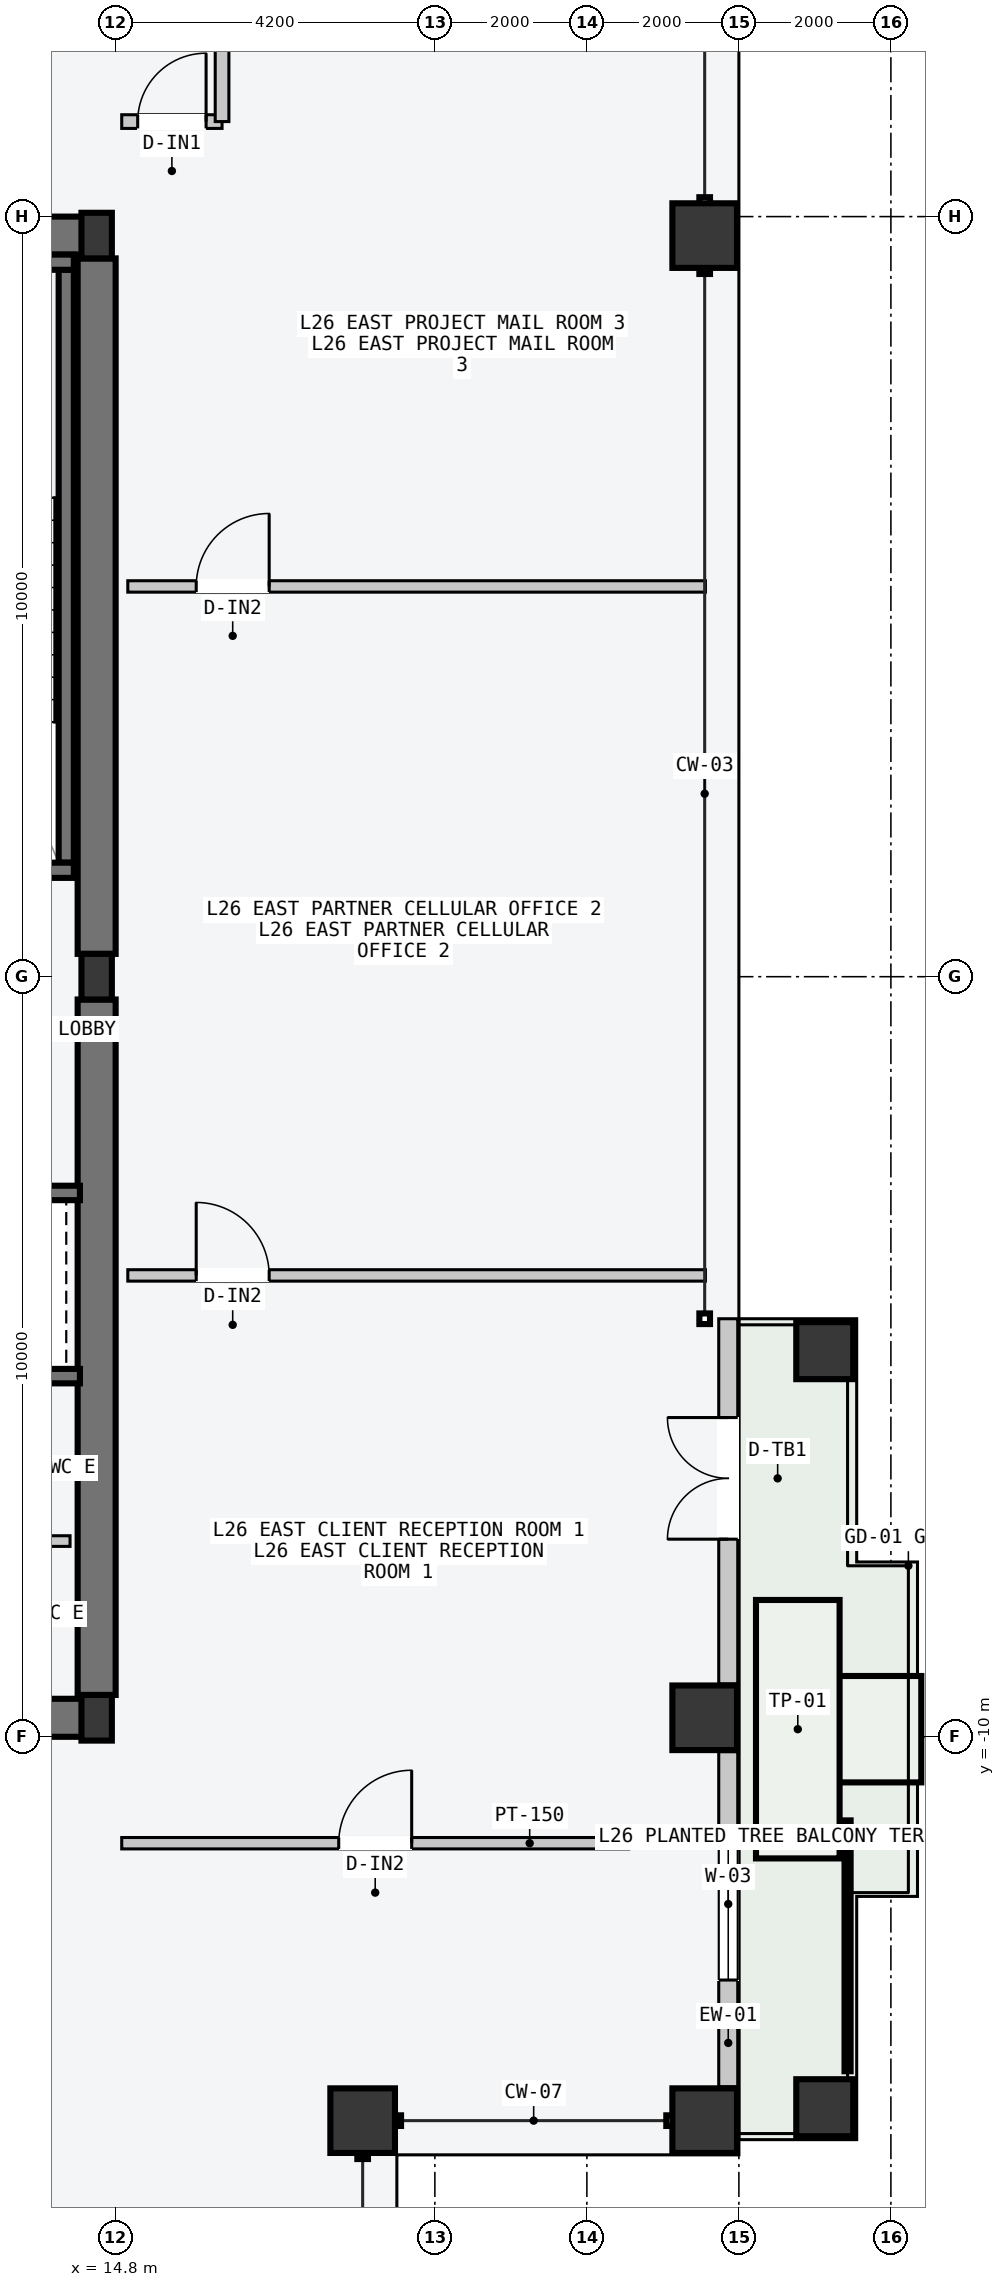
"""IFC4 building model, lengths in metres.
Left out: names, types, materials, properties, quantities, classifications, styles, units other than length and angle.
Written with IfcOpenShell. Run it as: python <this file> out.ifc"""

import sys

from ifc_helpers import new_model, si_unit, direction, frame, frame_2d, origin, origin_2d, place, context, subcontext, project, spatial, rectangle, hollow_rectangle, i_section, extrude, element, fill, save


model = new_model("IFC4")
c1 = context("Model", 3, precision=1e-05, world=origin(), true_north=direction((0.0, 1.0)))
c2 = subcontext(c1, "Body", "Model", "MODEL_VIEW")
j1 = project(units=[si_unit("LENGTHUNIT", "METRE"), si_unit("PLANEANGLEUNIT", "RADIAN")], contexts=[c1])
p1 = place(None, origin())
s1 = spatial("IfcSite", under=j1, at=p1, CompositionType="ELEMENT")
p2 = place(p1, origin())
s2 = spatial("IfcBuilding", under=s1, at=p2, CompositionType="ELEMENT")
p3 = place(p2, frame((0.0, 0.0, 102.6)))
s3 = spatial("IfcBuildingStorey", under=s2, at=p3, CompositionType="ELEMENT", Elevation=102.6)
for number, where, z_axis, x_axis in (
    (1, (8.07, -9.75, -0.2), (0.0, 0.0, 1.0), (1.0, 0.0, 0.0)),
    (2, (8.07, 9.75, -0.2), (0.0, 0.0, 1.0), (1.0, 0.0, 0.0)),
):
    element("IfcWall", number, at=place(p3, frame(where, z_axis=z_axis, x_axis=x_axis)), inside=s3, PredefinedType="SHEAR", context=c2, shape_type="SweptSolid", body=[
        extrude(rectangle(XDim=6.46, YDim=0.5, at=frame_2d((3.23, 0.0))), origin(), (0.0, 0.0, 1.0), 3.6),
    ])
for number, where, z_axis, x_axis in (
    (3, (14.55, -9.45, -0.2), (0.0, 0.0, 1.0), (0.0, 1.0, 0.0)),
    (4, (14.55, 0.3, -0.2), (0.0, 0.0, 1.0), (0.0, 1.0, 0.0)),
):
    element("IfcWall", number, at=place(p3, frame(where, z_axis=z_axis, x_axis=x_axis)), inside=s3, PredefinedType="SHEAR", context=c2, shape_type="SweptSolid", body=[
        extrude(rectangle(XDim=9.15, YDim=0.5, at=frame_2d((4.575, 0.0))), origin(), (0.0, 0.0, 1.0), 3.6),
    ])
p4 = place(p3, frame((14.15, 1.5, -0.2), z_axis=(0.0, 0.0, 1.0), x_axis=(0.0, 1.0, 0.0)))
e5 = element("IfcWall", 5, at=p4, inside=s3, PredefinedType="SOLIDWALL", context=c2, shape_type="SweptSolid", body=[
    extrude(rectangle(XDim=7.8, YDim=0.2, at=frame_2d((3.9, 0.0))), origin(), (0.0, 0.0, 1.0), 3.6),
])
p5 = place(p3, frame((10.15, 1.4, -0.2), z_axis=(0.0, 0.0, 1.0), x_axis=(1.0, 0.0, 0.0)))
e6 = element("IfcWall", 6, at=p5, inside=s3, PredefinedType="SOLIDWALL", context=c2, shape_type="SweptSolid", body=[
    extrude(rectangle(XDim=4.1, YDim=0.2, at=frame_2d((2.05, 0.0))), origin(), (0.0, 0.0, 1.0), 3.6),
])
p6 = place(p5, frame((1.5, 0.0, 0.2)))
e7 = element("IfcOpeningElement", 7, at=p6, cuts=e6, PredefinedType="OPENING", context=c2, shape_type="SweptSolid", body=[
    extrude(rectangle(XDim=1.12, YDim=2.18, at=frame_2d((0.56, 1.09))), frame((0.0, 0.11, 0.0), z_axis=(0.0, -1.0, 0.0), x_axis=(1.0, 0.0, 0.0)), (0.0, 0.0, 1.0), 0.22),
])
p7 = place(p3, frame((10.15, 9.4, -0.2), z_axis=(0.0, 0.0, 1.0), x_axis=(1.0, 0.0, 0.0)))
e8 = element("IfcWall", 8, at=p7, inside=s3, PredefinedType="SOLIDWALL", context=c2, shape_type="SweptSolid", body=[
    extrude(rectangle(XDim=4.1, YDim=0.2, at=frame_2d((2.05, 0.0))), origin(), (0.0, 0.0, 1.0), 3.6),
])
for number, where, z_axis, x_axis in (
    (9, (14.55, -9.75, 0.0), (0.0, 0.0, 1.0), (1.0, 0.0, 0.0)),
    (10, (14.55, 0.0, 0.0), (0.0, 0.0, 1.0), (1.0, 0.0, 0.0)),
    (11, (14.55, 9.75, 0.0), (0.0, 0.0, 1.0), (1.0, 0.0, 0.0)),
):
    element("IfcColumn", number, at=place(p3, frame(where, z_axis=z_axis, x_axis=x_axis)), inside=s3, PredefinedType="COLUMN", context=c2, shape_type="SweptSolid", body=[
        extrude(i_section(OverallWidth=0.4, OverallDepth=0.6, WebThickness=0.022, FlangeThickness=0.036, at=origin_2d()), origin(), (0.0, 0.0, 1.0), 3.6),
    ])
for number, where, z_axis, x_axis in (
    (12, (22.55, -15.05, 0.0), (0.0, 0.0, 1.0), (0.0, 1.0, 0.0)),
    (13, (22.55, -9.75, 0.0), (0.0, 0.0, 1.0), (0.0, 1.0, 0.0)),
    (14, (22.55, 9.75, 0.0), (0.0, 0.0, 1.0), (0.0, 1.0, 0.0)),
    (15, (18.05, -15.05, 0.0), (0.0, 0.0, 1.0), (1.0, 0.0, 0.0)),
):
    element("IfcColumn", number, at=place(p3, frame(where, z_axis=z_axis, x_axis=x_axis)), inside=s3, PredefinedType="COLUMN", context=c2, shape_type="SweptSolid", body=[
        extrude(hollow_rectangle(XDim=0.85, YDim=0.85, WallThickness=0.04, at=origin_2d()), origin(), (0.0, 0.0, 1.0), 3.6),
    ])
for number, where, z_axis, x_axis in (
    (16, (24.13, -14.88, 0.0), (0.0, 0.0, 1.0), (0.0, 1.0, 0.0)),
    (17, (24.13, -4.92, 0.0), (0.0, 0.0, 1.0), (0.0, 1.0, 0.0)),
):
    element("IfcColumn", number, at=place(p3, frame(where, z_axis=z_axis, x_axis=x_axis)), inside=s3, PredefinedType="COLUMN", context=c2, shape_type="SweptSolid", body=[
        extrude(hollow_rectangle(XDim=0.75, YDim=0.75, WallThickness=0.032, at=origin_2d()), origin(), (0.0, 0.0, 1.0), 3.6),
    ])
p8 = place(p3, frame((22.86, -14.605, 0.0), z_axis=(0.0, 0.0, 1.0), x_axis=(0.0, 1.0, 0.0)))
e18 = element("IfcWall", 18, at=p8, inside=s3, PredefinedType="STANDARD", context=c2, shape_type="SweptSolid", body=[
    extrude(rectangle(XDim=4.41, YDim=0.25, at=frame_2d((2.205, 0.0))), origin(), (0.0, 0.0, 1.0), 3.4),
])
p9 = place(p8, frame((1.405, 0.0, 0.85)))
e19 = element("IfcOpeningElement", 19, at=p9, cuts=e18, PredefinedType="OPENING", context=c2, shape_type="SweptSolid", body=[
    extrude(rectangle(XDim=2.0, YDim=2.1, at=frame_2d((1.0, 1.05))), frame((0.0, 0.135, 0.0), z_axis=(0.0, -1.0, 0.0), x_axis=(1.0, 0.0, 0.0)), (0.0, 0.0, 1.0), 0.27),
])
p10 = place(p3, frame((22.86, -9.305, 0.0), z_axis=(0.0, 0.0, 1.0), x_axis=(0.0, 1.0, 0.0)))
e20 = element("IfcWall", 20, at=p10, inside=s3, PredefinedType="STANDARD", context=c2, shape_type="SweptSolid", body=[
    extrude(rectangle(XDim=4.805, YDim=0.25, at=frame_2d((2.402, 0.0))), origin(), (0.0, 0.0, 1.0), 3.4),
])
p11 = place(p10, frame((1.905, 0.0, 0.0)))
e21 = element("IfcOpeningElement", 21, at=p11, cuts=e20, PredefinedType="OPENING", context=c2, shape_type="SweptSolid", body=[
    extrude(rectangle(XDim=1.6, YDim=2.2, at=frame_2d((0.8, 1.1))), frame((0.0, 0.135, 0.0), z_axis=(0.0, -1.0, 0.0), x_axis=(1.0, 0.0, 0.0)), (0.0, 0.0, 1.0), 0.27),
])
p12 = place(p3, frame((11.65, -2.845, -0.2), z_axis=(0.0, 0.0, 1.0), x_axis=(1.0, 0.0, 0.0)))
e22 = element("IfcWall", 22, at=p12, inside=s3, PredefinedType="SOLIDWALL", context=c2, shape_type="SweptSolid", body=[
    extrude(rectangle(XDim=2.68, YDim=0.19, at=frame_2d((1.34, 0.0))), origin(), (0.0, 0.0, 1.0), 3.6),
])
p13 = place(p12, frame((0.65, 0.0, 0.2)))
e23 = element("IfcOpeningElement", 23, at=p13, cuts=e22, PredefinedType="OPENING", context=c2, shape_type="SweptSolid", body=[
    extrude(rectangle(XDim=1.2, YDim=2.2, at=frame_2d((0.6, 1.1))), frame((0.0, 0.105, 0.0), z_axis=(0.0, -1.0, 0.0), x_axis=(1.0, 0.0, 0.0)), (0.0, 0.0, 1.0), 0.21),
])
p14 = place(p3, frame((11.65, -5.255, -0.2), z_axis=(0.0, 0.0, 1.0), x_axis=(1.0, 0.0, 0.0)))
e24 = element("IfcWall", 24, at=p14, inside=s3, PredefinedType="SOLIDWALL", context=c2, shape_type="SweptSolid", body=[
    extrude(rectangle(XDim=2.68, YDim=0.19, at=frame_2d((1.34, 0.0))), origin(), (0.0, 0.0, 1.0), 3.6),
])
p15 = place(p3, frame((11.7, -7.425, 0.0), z_axis=(0.0, 0.0, 1.0), x_axis=(1.0, 0.0, 0.0)))
e25 = element("IfcWall", 25, at=p15, inside=s3, PredefinedType="PARTITIONING", context=c2, shape_type="SweptSolid", body=[
    extrude(rectangle(XDim=2.5, YDim=0.14, at=frame_2d((1.25, 0.0))), origin(), (0.0, 0.0, 1.0), 3.4),
])
p16 = place(p3, frame((14.88, -11.4, 0.0), z_axis=(0.0, 0.0, 1.0), x_axis=(1.0, 0.0, 0.0)))
e26 = element("IfcWall", 26, at=p16, inside=s3, PredefinedType="PARTITIONING", context=c2, shape_type="SweptSolid", body=[
    extrude(rectangle(XDim=6.67, YDim=0.15, at=frame_2d((3.335, 0.0))), origin(), (0.0, 0.0, 1.0), 3.4),
])
p17 = place(p16, frame((2.855, 0.0, 0.0)))
e27 = element("IfcOpeningElement", 27, at=p17, cuts=e26, PredefinedType="OPENING", context=c2, shape_type="SweptSolid", body=[
    extrude(rectangle(XDim=0.96, YDim=2.18, at=frame_2d((0.48, 1.09))), frame((0.0, 0.085, 0.0), z_axis=(0.0, -1.0, 0.0), x_axis=(1.0, 0.0, 0.0)), (0.0, 0.0, 1.0), 0.17),
])
p18 = place(p3, frame((14.88, 11.25, 0.0), z_axis=(0.0, 0.0, 1.0), x_axis=(1.0, 0.0, 0.0)))
e28 = element("IfcWall", 28, at=p18, inside=s3, PredefinedType="PARTITIONING", context=c2, shape_type="SweptSolid", body=[
    extrude(rectangle(XDim=1.32, YDim=0.18, at=frame_2d((0.66, 0.0))), origin(), (0.0, 0.0, 1.0), 3.4),
])
p19 = place(p18, frame((0.21, 0.0, 0.0)))
e29 = element("IfcOpeningElement", 29, at=p19, cuts=e28, PredefinedType="OPENING", context=c2, shape_type="SweptSolid", body=[
    extrude(rectangle(XDim=0.9, YDim=2.15, at=frame_2d((0.45, 1.075))), frame((0.0, 0.1, 0.0), z_axis=(0.0, -1.0, 0.0), x_axis=(1.0, 0.0, 0.0)), (0.0, 0.0, 1.0), 0.2),
])
p20 = place(p3, frame((16.2, 11.25, 0.0), z_axis=(0.0, 0.0, 1.0), x_axis=(0.0, 1.0, 0.0)))
e30 = element("IfcWall", 30, at=p20, inside=s3, PredefinedType="PARTITIONING", context=c2, shape_type="SweptSolid", body=[
    extrude(rectangle(XDim=1.95, YDim=0.18, at=frame_2d((0.975, 0.0))), origin(), (0.0, 0.0, 1.0), 3.4),
])
p21 = place(p3, frame((14.96, -3.93, 0.0), z_axis=(0.0, 0.0, 1.0), x_axis=(1.0, 0.0, 0.0)))
e31 = element("IfcWall", 31, at=p21, inside=s3, PredefinedType="PARTITIONING", context=c2, shape_type="SweptSolid", body=[
    extrude(rectangle(XDim=7.6, YDim=0.15, at=frame_2d((3.8, 0.0))), origin(), (0.0, 0.0, 1.0), 3.4),
])
p22 = place(p21, frame((0.9, 0.0, 0.0)))
e32 = element("IfcOpeningElement", 32, at=p22, cuts=e31, PredefinedType="OPENING", context=c2, shape_type="SweptSolid", body=[
    extrude(rectangle(XDim=0.96, YDim=2.18, at=frame_2d((0.48, 1.09))), frame((0.0, 0.085, 0.0), z_axis=(0.0, -1.0, 0.0), x_axis=(1.0, 0.0, 0.0)), (0.0, 0.0, 1.0), 0.17),
])
p23 = place(p3, frame((14.96, 5.134, 0.0), z_axis=(0.0, 0.0, 1.0), x_axis=(1.0, 0.0, 0.0)))
e33 = element("IfcWall", 33, at=p23, inside=s3, PredefinedType="PARTITIONING", context=c2, shape_type="SweptSolid", body=[
    extrude(rectangle(XDim=7.6, YDim=0.15, at=frame_2d((3.8, 0.0))), origin(), (0.0, 0.0, 1.0), 3.4),
])
p24 = place(p23, frame((0.9, 0.0, 0.0)))
e34 = element("IfcOpeningElement", 34, at=p24, cuts=e33, PredefinedType="OPENING", context=c2, shape_type="SweptSolid", body=[
    extrude(rectangle(XDim=0.96, YDim=2.18, at=frame_2d((0.48, 1.09))), frame((0.0, 0.085, 0.0), z_axis=(0.0, -1.0, 0.0), x_axis=(1.0, 0.0, 0.0)), (0.0, 0.0, 1.0), 0.17),
])
p25 = place(p9, origin())
e35 = element("IfcWindow", 35, at=p25, inside=s3, PartitioningType="SINGLE_PANEL", PredefinedType="WINDOW", context=c2, shape_type="SweptSolid", body=[
    extrude(rectangle(XDim=2.0, YDim=2.1, at=frame_2d((1.0, 1.05))), frame((0.0, 0.03, 0.0), z_axis=(0.0, -1.0, 0.0), x_axis=(1.0, 0.0, 0.0)), (0.0, 0.0, 1.0), 0.06),
])
fill(e19, e35)
p26 = place(p11, origin())
e36 = element("IfcDoor", 36, at=p26, inside=s3, OperationType="DOUBLE_DOOR_SINGLE_SWING", PredefinedType="DOOR", context=c2, shape_type="SweptSolid", body=[
    extrude(rectangle(XDim=1.6, YDim=2.2, at=frame_2d((0.8, 1.1))), frame((0.0, 0.025, 0.0), z_axis=(0.0, -1.0, 0.0), x_axis=(1.0, 0.0, 0.0)), (0.0, 0.0, 1.0), 0.05),
])
fill(e21, e36)
p27 = place(p17, origin())
e37 = element("IfcDoor", 37, at=p27, inside=s3, OperationType="SINGLE_SWING_RIGHT", PredefinedType="DOOR", context=c2, shape_type="SweptSolid", body=[
    extrude(rectangle(XDim=0.96, YDim=2.18, at=frame_2d((0.48, 1.09))), frame((0.0, 0.025, 0.0), z_axis=(0.0, -1.0, 0.0), x_axis=(1.0, 0.0, 0.0)), (0.0, 0.0, 1.0), 0.05),
])
fill(e27, e37)
p28 = place(p19, origin())
e38 = element("IfcDoor", 38, at=p28, inside=s3, OperationType="SINGLE_SWING_RIGHT", PredefinedType="DOOR", context=c2, shape_type="SweptSolid", body=[
    extrude(rectangle(XDim=0.9, YDim=2.15, at=frame_2d((0.45, 1.075))), frame((0.0, 0.025, 0.0), z_axis=(0.0, -1.0, 0.0), x_axis=(1.0, 0.0, 0.0)), (0.0, 0.0, 1.0), 0.05),
])
fill(e29, e38)
p29 = place(p22, origin())
e39 = element("IfcDoor", 39, at=p29, inside=s3, OperationType="SINGLE_SWING_LEFT", PredefinedType="DOOR", context=c2, shape_type="SweptSolid", body=[
    extrude(rectangle(XDim=0.96, YDim=2.18, at=frame_2d((0.48, 1.09))), frame((0.0, 0.025, 0.0), z_axis=(0.0, -1.0, 0.0), x_axis=(1.0, 0.0, 0.0)), (0.0, 0.0, 1.0), 0.05),
])
fill(e32, e39)
p30 = place(p24, origin())
e40 = element("IfcDoor", 40, at=p30, inside=s3, OperationType="SINGLE_SWING_RIGHT", PredefinedType="DOOR", context=c2, shape_type="SweptSolid", body=[
    extrude(rectangle(XDim=0.96, YDim=2.18, at=frame_2d((0.48, 1.09))), frame((0.0, 0.025, 0.0), z_axis=(0.0, -1.0, 0.0), x_axis=(1.0, 0.0, 0.0)), (0.0, 0.0, 1.0), 0.05),
])
fill(e34, e40)
save(model, sys.argv[1])
